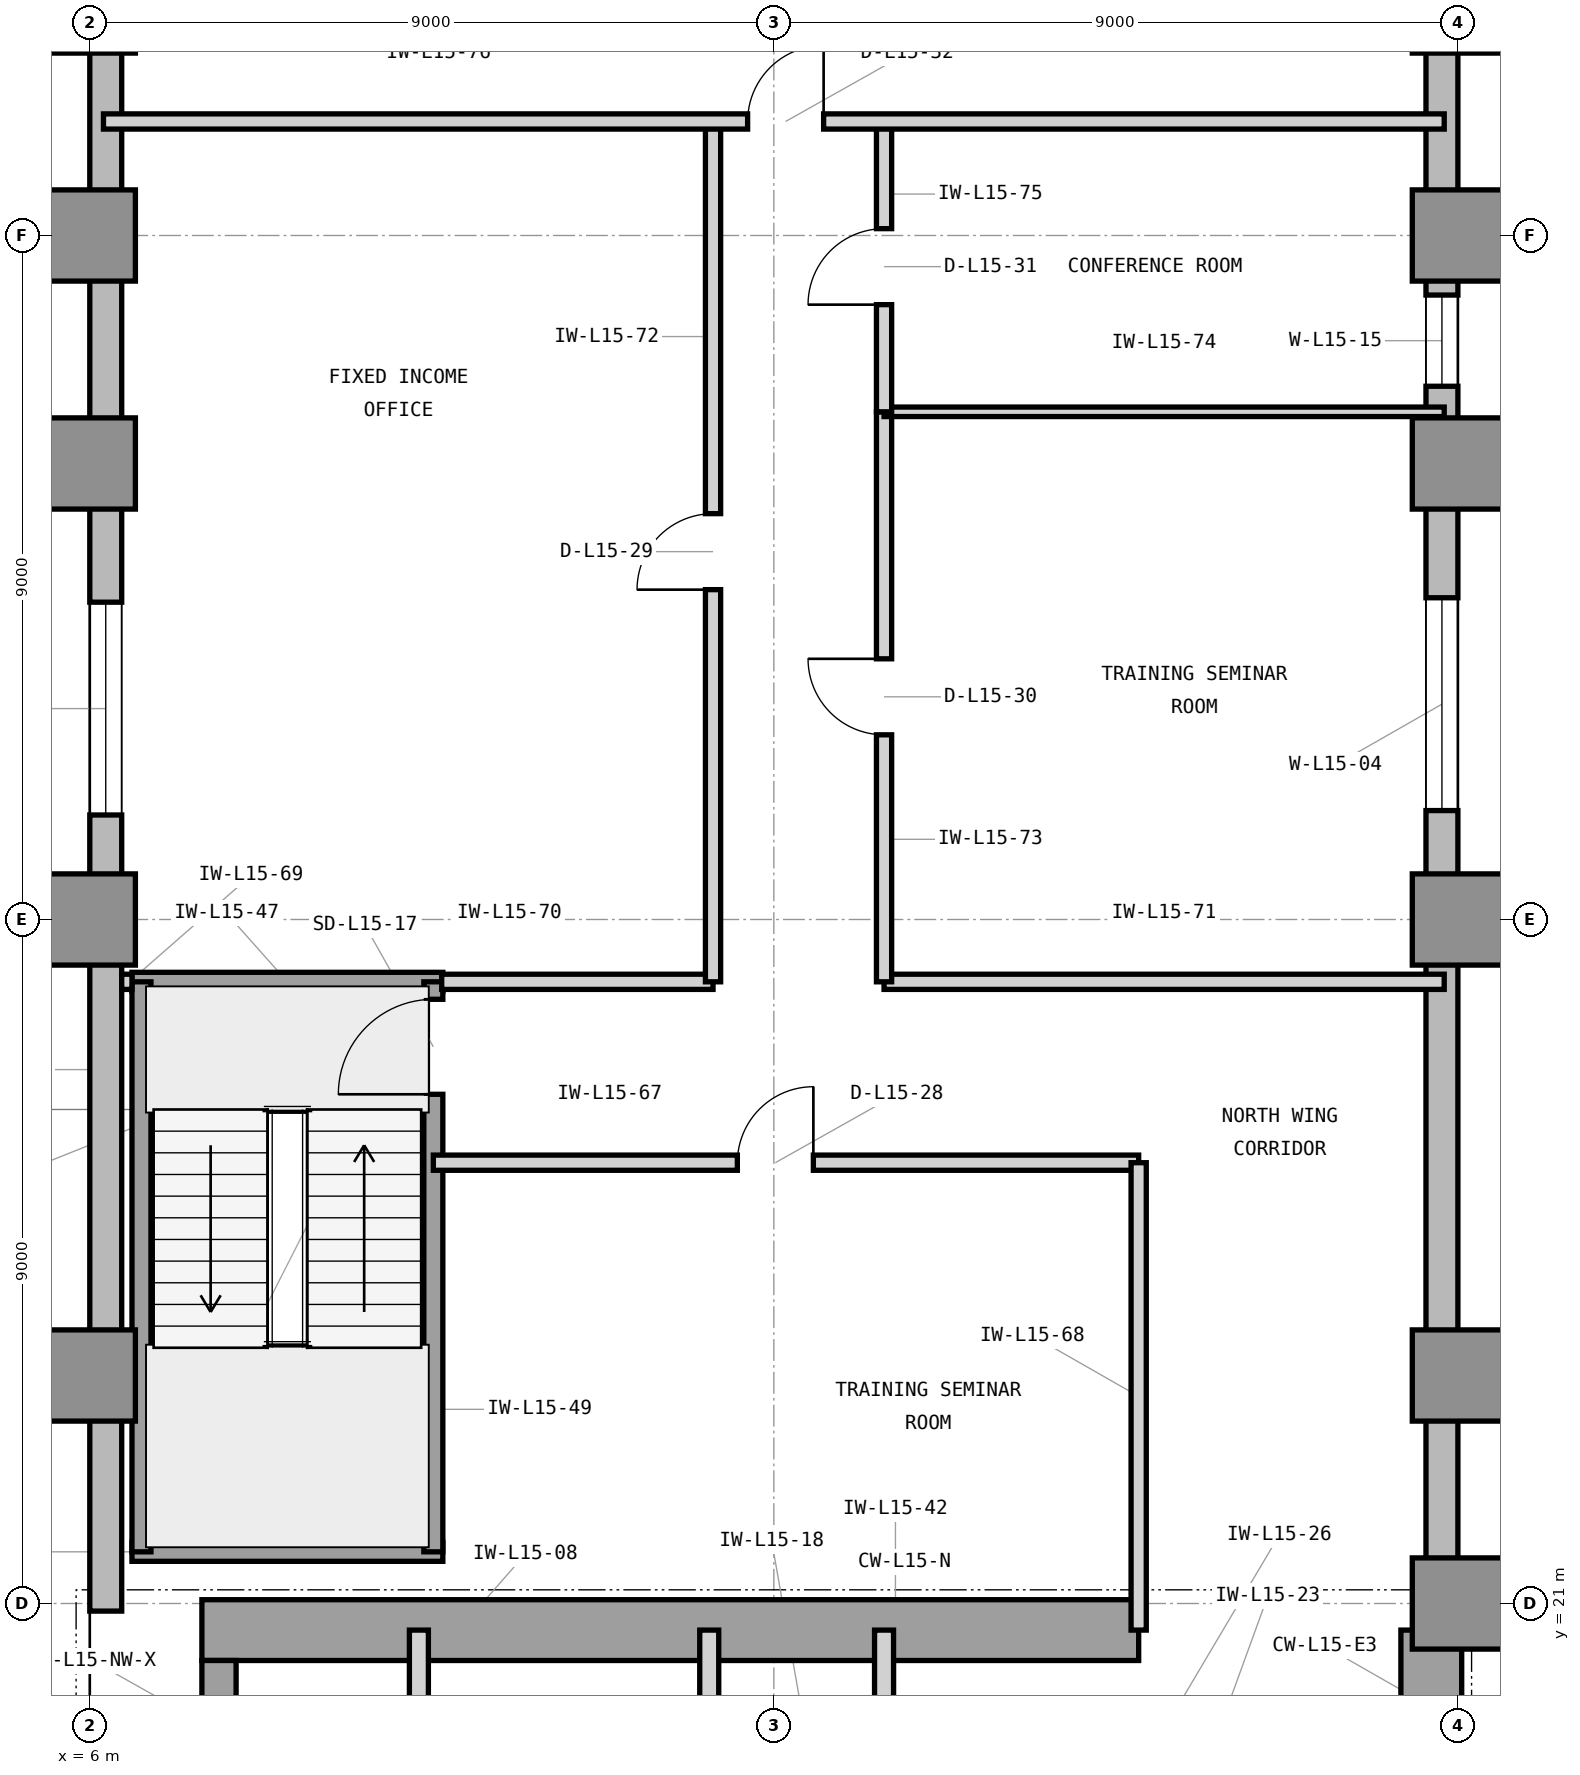
"""IFC4 building model, lengths in metres.
Left out: names, types, materials, properties, quantities, classifications, styles, units other than length and angle.
Written with IfcOpenShell. Run it as: python <this file> out.ifc"""

import sys

from ifc_helpers import new_model, si_unit, direction, frame, frame_2d, origin, origin_2d, place, context, subcontext, project, spatial, rectangle, extrude, element, fill, save


model = new_model("IFC4")
c1 = context("Model", 3, precision=1e-05, world=origin(), true_north=direction((0.0, 1.0)))
c2 = subcontext(c1, "Body", "Model", "MODEL_VIEW")
j1 = project(units=[si_unit("LENGTHUNIT", "METRE"), si_unit("PLANEANGLEUNIT", "RADIAN")], contexts=[c1])
p1 = place(None, origin())
s1 = spatial("IfcSite", under=j1, at=p1, CompositionType="ELEMENT")
p2 = place(p1, origin())
s2 = spatial("IfcBuilding", under=s1, at=p2, CompositionType="ELEMENT")
p3 = place(p2, frame((0.0, 0.0, 67.8)))
s3 = spatial("IfcBuildingStorey", under=s2, at=p3, CompositionType="ELEMENT", Elevation=67.8)
p4 = place(p3, frame((7.475, 20.65, 0.0), z_axis=(0.0, 0.0, 1.0), x_axis=(1.0, 0.0, 0.0)))
e1 = element("IfcWall", 1, at=p4, inside=s3, PredefinedType="SHEAR", context=c2, shape_type="SweptSolid", body=[
    extrude(rectangle(XDim=12.325, YDim=0.8, at=frame_2d((6.163, 0.0))), origin(), (0.0, 0.0, 1.0), 4.2),
])
p5 = place(p3, frame((23.65, 16.6, 0.0), z_axis=(0.0, 0.0, 1.0), x_axis=(0.0, 1.0, 0.0)))
e2 = element("IfcWall", 2, at=p5, inside=s3, PredefinedType="SHEAR", context=c2, shape_type="SweptSolid", body=[
    extrude(rectangle(XDim=4.05, YDim=0.8, at=frame_2d((2.025, 0.0))), origin(), (0.0, 0.0, 1.0), 4.2),
])
p6 = place(p3, frame((7.7, 19.575, 0.0), z_axis=(0.0, 0.0, 1.0), x_axis=(0.0, 1.0, 0.0)))
e3 = element("IfcWall", 3, at=p6, inside=s3, PredefinedType="SHEAR", context=c2, shape_type="SweptSolid", body=[
    extrude(rectangle(XDim=0.675, YDim=0.45, at=frame_2d((0.337, 0.0))), origin(), (0.0, 0.0, 1.0), 4.2),
])
for number, where, z_axis, x_axis in (
    (4, (24.0, 21.0, 0.0), (0.0, 0.0, 1.0), (1.0, 0.0, 0.0)),
    (5, (6.0, 24.0, 0.0), (0.0, 0.0, 1.0), (1.0, 0.0, 0.0)),
    (6, (24.0, 24.0, 0.0), (0.0, 0.0, 1.0), (1.0, 0.0, 0.0)),
    (7, (6.0, 30.0, 0.0), (0.0, 0.0, 1.0), (1.0, 0.0, 0.0)),
    (8, (24.0, 30.0, 0.0), (0.0, 0.0, 1.0), (1.0, 0.0, 0.0)),
    (9, (6.0, 36.0, 0.0), (0.0, 0.0, 1.0), (1.0, 0.0, 0.0)),
    (10, (24.0, 36.0, 0.0), (0.0, 0.0, 1.0), (1.0, 0.0, 0.0)),
    (11, (6.0, 39.0, 0.0), (0.0, 0.0, 1.0), (1.0, 0.0, 0.0)),
    (12, (24.0, 39.0, 0.0), (0.0, 0.0, 1.0), (1.0, 0.0, 0.0)),
    (13, (6.0, 42.0, 0.0), (0.0, 0.0, 1.0), (1.0, 0.0, 0.0)),
    (14, (24.0, 42.0, 0.0), (0.0, 0.0, 1.0), (1.0, 0.0, 0.0)),
):
    element("IfcColumn", number, at=place(p3, frame(where, z_axis=z_axis, x_axis=x_axis)), inside=s3, PredefinedType="COLUMN", context=c2, shape_type="SweptSolid", body=[
        extrude(rectangle(XDim=1.2, YDim=1.2, at=origin_2d()), origin(), (0.0, 0.0, 1.0), 4.2),
    ])
p7 = place(p3, frame((64.4, 20.79, 0.0), z_axis=(0.0, 0.0, 1.0), x_axis=(-1.0, 0.0, 0.0)))
e15 = element("IfcWall", 15, at=p7, inside=s3, PredefinedType="STANDARD", context=c2, shape_type="SweptSolid", body=[
    extrude(rectangle(XDim=40.4, YDim=0.42, at=frame_2d((20.2, 0.0))), origin(), (0.0, 0.0, 1.0), 3.98),
])
p8 = place(p7, frame((26.375, 0.0, 0.85)))
e16 = element("IfcOpeningElement", 16, at=p8, cuts=e15, PredefinedType="OPENING", context=c2, shape_type="SweptSolid", body=[
    extrude(rectangle(XDim=2.8, YDim=2.45, at=frame_2d((1.4, 1.225))), frame((0.0, 0.22, 0.0), z_axis=(0.0, -1.0, 0.0), x_axis=(1.0, 0.0, 0.0)), (0.0, 0.0, 1.0), 0.44),
])
p9 = place(p7, frame((38.222, 0.0, 0.85)))
e17 = element("IfcOpeningElement", 17, at=p9, cuts=e15, PredefinedType="OPENING", context=c2, shape_type="SweptSolid", body=[
    extrude(rectangle(XDim=1.2, YDim=2.45, at=frame_2d((0.6, 1.225))), frame((0.0, 0.22, 0.0), z_axis=(0.0, -1.0, 0.0), x_axis=(1.0, 0.0, 0.0)), (0.0, 0.0, 1.0), 0.44),
])
p10 = place(p7, frame((32.536, 0.0, 0.85)))
e18 = element("IfcOpeningElement", 18, at=p10, cuts=e15, PredefinedType="OPENING", context=c2, shape_type="SweptSolid", body=[
    extrude(rectangle(XDim=2.8, YDim=2.45, at=frame_2d((1.4, 1.225))), frame((0.0, 0.22, 0.0), z_axis=(0.0, -1.0, 0.0), x_axis=(1.0, 0.0, 0.0)), (0.0, 0.0, 1.0), 0.44),
])
p11 = place(p7, frame((17.386, 0.0, 0.85)))
e19 = element("IfcOpeningElement", 19, at=p11, cuts=e15, PredefinedType="OPENING", context=c2, shape_type="SweptSolid", body=[
    extrude(rectangle(XDim=2.8, YDim=2.45, at=frame_2d((1.4, 1.225))), frame((0.0, 0.22, 0.0), z_axis=(0.0, -1.0, 0.0), x_axis=(1.0, 0.0, 0.0)), (0.0, 0.0, 1.0), 0.44),
])
p12 = place(p3, frame((23.79, 21.0, 0.0), z_axis=(0.0, 0.0, 1.0), x_axis=(0.0, 1.0, 0.0)))
e20 = element("IfcWall", 20, at=p12, inside=s3, PredefinedType="STANDARD", context=c2, shape_type="SweptSolid", body=[
    extrude(rectangle(XDim=28.4, YDim=0.42, at=frame_2d((14.2, 0.0))), origin(), (0.0, 0.0, 1.0), 3.98),
])
p13 = place(p12, frame((10.433, 0.0, 0.85)))
e21 = element("IfcOpeningElement", 21, at=p13, cuts=e20, PredefinedType="OPENING", context=c2, shape_type="SweptSolid", body=[
    extrude(rectangle(XDim=2.8, YDim=2.45, at=frame_2d((1.4, 1.225))), frame((0.0, 0.22, 0.0), z_axis=(0.0, -1.0, 0.0), x_axis=(1.0, 0.0, 0.0)), (0.0, 0.0, 1.0), 0.44),
])
p14 = place(p12, frame((16.016, 0.0, 0.85)))
e22 = element("IfcOpeningElement", 22, at=p14, cuts=e20, PredefinedType="OPENING", context=c2, shape_type="SweptSolid", body=[
    extrude(rectangle(XDim=1.2, YDim=2.45, at=frame_2d((0.6, 1.225))), frame((0.0, 0.22, 0.0), z_axis=(0.0, -1.0, 0.0), x_axis=(1.0, 0.0, 0.0)), (0.0, 0.0, 1.0), 0.44),
])
p15 = place(p3, frame((6.21, 49.4, 0.0), z_axis=(0.0, 0.0, 1.0), x_axis=(0.0, -1.0, 0.0)))
e23 = element("IfcWall", 23, at=p15, inside=s3, PredefinedType="STANDARD", context=c2, shape_type="SweptSolid", body=[
    extrude(rectangle(XDim=28.5, YDim=0.42, at=frame_2d((14.25, 0.0))), origin(), (0.0, 0.0, 1.0), 3.98),
])
p16 = place(p15, frame((15.225, 0.0, 0.85)))
e24 = element("IfcOpeningElement", 24, at=p16, cuts=e23, PredefinedType="OPENING", context=c2, shape_type="SweptSolid", body=[
    extrude(rectangle(XDim=2.8, YDim=2.45, at=frame_2d((1.4, 1.225))), frame((0.0, 0.22, 0.0), z_axis=(0.0, -1.0, 0.0), x_axis=(1.0, 0.0, 0.0)), (0.0, 0.0, 1.0), 0.44),
])
p17 = place(p3, frame((10.33, 19.45, 0.0), z_axis=(0.0, 0.0, 1.0), x_axis=(0.0, 1.0, 0.0)))
e25 = element("IfcWall", 25, at=p17, inside=s3, PredefinedType="PARTITIONING", context=c2, shape_type="SweptSolid", body=[
    extrude(rectangle(XDim=1.2, YDim=0.25, at=frame_2d((0.6, 0.0))), origin(), (0.0, 0.0, 1.0), 3.114),
])
for number, where, z_axis, x_axis in (
    (26, (14.15, 16.7, 0.0), (0.0, 0.0, 1.0), (0.0, 1.0, 0.0)),
    (27, (16.45, 16.7, 0.0), (0.0, 0.0, 1.0), (0.0, 1.0, 0.0)),
):
    element("IfcWall", number, at=place(p3, frame(where, z_axis=z_axis, x_axis=x_axis)), inside=s3, PredefinedType="PARTITIONING", context=c2, shape_type="SweptSolid", body=[
        extrude(rectangle(XDim=3.95, YDim=0.25, at=frame_2d((1.975, 0.0))), origin(), (0.0, 0.0, 1.0), 3.97),
    ])
for number, where, z_axis, x_axis in (
    (28, (6.555, 21.68, 0.0), (0.0, 0.0, 1.0), (1.0, 0.0, 0.0)),
    (29, (6.555, 29.18, 0.0), (0.0, 0.0, 1.0), (1.0, 0.0, 0.0)),
):
    element("IfcWall", number, at=place(p3, frame(where, z_axis=z_axis, x_axis=x_axis)), inside=s3, PredefinedType="SHEAR", context=c2, shape_type="SweptSolid", body=[
        extrude(rectangle(XDim=4.09, YDim=0.25, at=frame_2d((2.045, 0.0))), origin(), (0.0, 0.0, 1.0), 4.2),
    ])
p18 = place(p3, frame((6.68, 21.68, 0.0), z_axis=(0.0, 0.0, 1.0), x_axis=(0.0, 1.0, 0.0)))
e30 = element("IfcWall", 30, at=p18, inside=s3, PredefinedType="SHEAR", context=c2, shape_type="SweptSolid", body=[
    extrude(rectangle(XDim=7.5, YDim=0.25, at=frame_2d((3.75, 0.0))), origin(), (0.0, 0.0, 1.0), 4.2),
])
p19 = place(p3, frame((10.52, 21.68, 0.0), z_axis=(0.0, 0.0, 1.0), x_axis=(0.0, 1.0, 0.0)))
e31 = element("IfcWall", 31, at=p19, inside=s3, PredefinedType="SHEAR", context=c2, shape_type="SweptSolid", body=[
    extrude(rectangle(XDim=7.5, YDim=0.25, at=frame_2d((3.75, 0.0))), origin(), (0.0, 0.0, 1.0), 4.2),
])
p20 = place(p19, frame((6.02, 0.0, 0.0)))
e32 = element("IfcOpeningElement", 32, at=p20, cuts=e31, PredefinedType="OPENING", context=c2, shape_type="SweptSolid", body=[
    extrude(rectangle(XDim=1.25, YDim=2.2, at=frame_2d((0.625, 1.1))), frame((0.0, 0.135, 0.0), z_axis=(0.0, -1.0, 0.0), x_axis=(1.0, 0.0, 0.0)), (0.0, 0.0, 1.0), 0.27),
])
p21 = place(p3, frame((10.52, 26.8, 0.0), z_axis=(0.0, 0.0, 1.0), x_axis=(1.0, 0.0, 0.0)))
e33 = element("IfcWall", 33, at=p21, inside=s3, PredefinedType="PARTITIONING", context=c2, shape_type="SweptSolid", body=[
    extrude(rectangle(XDim=9.28, YDim=0.2, at=frame_2d((4.64, 0.0))), origin(), (0.0, 0.0, 1.0), 3.97),
])
p22 = place(p21, frame((4.0, 0.0, 0.0)))
e34 = element("IfcOpeningElement", 34, at=p22, cuts=e33, PredefinedType="OPENING", context=c2, shape_type="SweptSolid", body=[
    extrude(rectangle(XDim=1.0, YDim=2.15, at=frame_2d((0.5, 1.075))), frame((0.0, 0.11, 0.0), z_axis=(0.0, -1.0, 0.0), x_axis=(1.0, 0.0, 0.0)), (0.0, 0.0, 1.0), 0.22),
])
p23 = place(p3, frame((19.8, 20.65, 0.0), z_axis=(0.0, 0.0, 1.0), x_axis=(0.0, 1.0, 0.0)))
e35 = element("IfcWall", 35, at=p23, inside=s3, PredefinedType="PARTITIONING", context=c2, shape_type="SweptSolid", body=[
    extrude(rectangle(XDim=6.15, YDim=0.2, at=frame_2d((3.075, 0.0))), origin(), (0.0, 0.0, 1.0), 3.97),
])
p24 = place(p3, frame((6.42, 29.18, 0.0), z_axis=(0.0, 0.0, 1.0), x_axis=(1.0, 0.0, 0.0)))
e36 = element("IfcWall", 36, at=p24, inside=s3, PredefinedType="PARTITIONING", context=c2, shape_type="SweptSolid", body=[
    extrude(rectangle(XDim=0.135, YDim=0.2, at=frame_2d((0.067, 0.0))), origin(), (0.0, 0.0, 1.0), 3.97),
])
p25 = place(p3, frame((10.63, 29.18, 0.0), z_axis=(0.0, 0.0, 1.0), x_axis=(1.0, 0.0, 0.0)))
e37 = element("IfcWall", 37, at=p25, inside=s3, PredefinedType="PARTITIONING", context=c2, shape_type="SweptSolid", body=[
    extrude(rectangle(XDim=3.57, YDim=0.2, at=frame_2d((1.785, 0.0))), origin(), (0.0, 0.0, 1.0), 3.97),
])
p26 = place(p3, frame((16.45, 29.18, 0.0), z_axis=(0.0, 0.0, 1.0), x_axis=(1.0, 0.0, 0.0)))
e38 = element("IfcWall", 38, at=p26, inside=s3, PredefinedType="PARTITIONING", context=c2, shape_type="SweptSolid", body=[
    extrude(rectangle(XDim=7.37, YDim=0.2, at=frame_2d((3.685, 0.0))), origin(), (0.0, 0.0, 1.0), 3.97),
])
p27 = place(p3, frame((14.2, 29.18, 0.0), z_axis=(0.0, 0.0, 1.0), x_axis=(0.0, 1.0, 0.0)))
e39 = element("IfcWall", 39, at=p27, inside=s3, PredefinedType="PARTITIONING", context=c2, shape_type="SweptSolid", body=[
    extrude(rectangle(XDim=11.32, YDim=0.2, at=frame_2d((5.66, 0.0))), origin(), (0.0, 0.0, 1.0), 3.97),
])
p28 = place(p27, frame((5.16, 0.0, 0.0)))
e40 = element("IfcOpeningElement", 40, at=p28, cuts=e39, PredefinedType="OPENING", context=c2, shape_type="SweptSolid", body=[
    extrude(rectangle(XDim=1.0, YDim=2.15, at=frame_2d((0.5, 1.075))), frame((0.0, 0.11, 0.0), z_axis=(0.0, -1.0, 0.0), x_axis=(1.0, 0.0, 0.0)), (0.0, 0.0, 1.0), 0.22),
])
p29 = place(p3, frame((16.45, 29.18, 0.0), z_axis=(0.0, 0.0, 1.0), x_axis=(0.0, 1.0, 0.0)))
e41 = element("IfcWall", 41, at=p29, inside=s3, PredefinedType="PARTITIONING", context=c2, shape_type="SweptSolid", body=[
    extrude(rectangle(XDim=7.5, YDim=0.2, at=frame_2d((3.75, 0.0))), origin(), (0.0, 0.0, 1.0), 3.97),
])
p30 = place(p29, frame((3.25, 0.0, 0.0)))
e42 = element("IfcOpeningElement", 42, at=p30, cuts=e41, PredefinedType="OPENING", context=c2, shape_type="SweptSolid", body=[
    extrude(rectangle(XDim=1.0, YDim=2.15, at=frame_2d((0.5, 1.075))), frame((0.0, 0.11, 0.0), z_axis=(0.0, -1.0, 0.0), x_axis=(1.0, 0.0, 0.0)), (0.0, 0.0, 1.0), 0.22),
])
p31 = place(p3, frame((16.45, 36.68, 0.0), z_axis=(0.0, 0.0, 1.0), x_axis=(1.0, 0.0, 0.0)))
e43 = element("IfcWall", 43, at=p31, inside=s3, PredefinedType="PARTITIONING", context=c2, shape_type="SweptSolid", body=[
    extrude(rectangle(XDim=7.37, YDim=0.125, at=frame_2d((3.685, 0.0))), origin(), (0.0, 0.0, 1.0), 3.97),
])
p32 = place(p3, frame((16.45, 36.68, 0.0), z_axis=(0.0, 0.0, 1.0), x_axis=(0.0, 1.0, 0.0)))
e44 = element("IfcWall", 44, at=p32, inside=s3, PredefinedType="PARTITIONING", context=c2, shape_type="SweptSolid", body=[
    extrude(rectangle(XDim=3.82, YDim=0.2, at=frame_2d((1.91, 0.0))), origin(), (0.0, 0.0, 1.0), 3.97),
])
p33 = place(p32, frame((1.41, 0.0, 0.0)))
e45 = element("IfcOpeningElement", 45, at=p33, cuts=e44, PredefinedType="OPENING", context=c2, shape_type="SweptSolid", body=[
    extrude(rectangle(XDim=1.0, YDim=2.15, at=frame_2d((0.5, 1.075))), frame((0.0, 0.11, 0.0), z_axis=(0.0, -1.0, 0.0), x_axis=(1.0, 0.0, 0.0)), (0.0, 0.0, 1.0), 0.22),
])
p34 = place(p3, frame((6.18, 40.5, 0.0), z_axis=(0.0, 0.0, 1.0), x_axis=(1.0, 0.0, 0.0)))
e46 = element("IfcWall", 46, at=p34, inside=s3, PredefinedType="PARTITIONING", context=c2, shape_type="SweptSolid", body=[
    extrude(rectangle(XDim=17.64, YDim=0.2, at=frame_2d((8.82, 0.0))), origin(), (0.0, 0.0, 1.0), 3.97),
])
p35 = place(p34, frame((8.475, 0.0, 0.0)))
e47 = element("IfcOpeningElement", 47, at=p35, cuts=e46, PredefinedType="OPENING", context=c2, shape_type="SweptSolid", body=[
    extrude(rectangle(XDim=1.0, YDim=2.15, at=frame_2d((0.5, 1.075))), frame((0.0, 0.11, 0.0), z_axis=(0.0, -1.0, 0.0), x_axis=(1.0, 0.0, 0.0)), (0.0, 0.0, 1.0), 0.22),
])
p36 = place(p13, origin())
e48 = element("IfcWindow", 48, at=p36, inside=s3, PartitioningType="SINGLE_PANEL", PredefinedType="WINDOW", context=c2, shape_type="SweptSolid", body=[
    extrude(rectangle(XDim=2.8, YDim=2.45, at=frame_2d((1.4, 1.225))), frame((0.0, 0.11, 0.0), z_axis=(0.0, -1.0, 0.0), x_axis=(1.0, 0.0, 0.0)), (0.0, 0.0, 1.0), 0.06),
])
fill(e21, e48)
p37 = place(p16, origin())
e49 = element("IfcWindow", 49, at=p37, inside=s3, PartitioningType="SINGLE_PANEL", PredefinedType="WINDOW", context=c2, shape_type="SweptSolid", body=[
    extrude(rectangle(XDim=2.8, YDim=2.45, at=frame_2d((1.4, 1.225))), frame((0.0, 0.11, 0.0), z_axis=(0.0, -1.0, 0.0), x_axis=(1.0, 0.0, 0.0)), (0.0, 0.0, 1.0), 0.06),
])
fill(e24, e49)
p38 = place(p20, origin())
e50 = element("IfcDoor", 50, at=p38, inside=s3, OperationType="SINGLE_SWING_LEFT", PredefinedType="DOOR", context=c2, shape_type="SweptSolid", body=[
    extrude(rectangle(XDim=1.25, YDim=2.2, at=frame_2d((0.625, 1.1))), frame((0.0, 0.025, 0.0), z_axis=(0.0, -1.0, 0.0), x_axis=(1.0, 0.0, 0.0)), (0.0, 0.0, 1.0), 0.05),
])
fill(e32, e50)
p39 = place(p22, origin())
e51 = element("IfcDoor", 51, at=p39, inside=s3, OperationType="SINGLE_SWING_RIGHT", PredefinedType="DOOR", context=c2, shape_type="SweptSolid", body=[
    extrude(rectangle(XDim=1.0, YDim=2.15, at=frame_2d((0.5, 1.075))), frame((0.0, 0.025, 0.0), z_axis=(0.0, -1.0, 0.0), x_axis=(1.0, 0.0, 0.0)), (0.0, 0.0, 1.0), 0.05),
])
fill(e34, e51)
p40 = place(p28, origin())
e52 = element("IfcDoor", 52, at=p40, inside=s3, OperationType="SINGLE_SWING_LEFT", PredefinedType="DOOR", context=c2, shape_type="SweptSolid", body=[
    extrude(rectangle(XDim=1.0, YDim=2.15, at=frame_2d((0.5, 1.075))), frame((0.0, 0.025, 0.0), z_axis=(0.0, -1.0, 0.0), x_axis=(1.0, 0.0, 0.0)), (0.0, 0.0, 1.0), 0.05),
])
fill(e40, e52)
p41 = place(p30, origin())
e53 = element("IfcDoor", 53, at=p41, inside=s3, OperationType="SINGLE_SWING_RIGHT", PredefinedType="DOOR", context=c2, shape_type="SweptSolid", body=[
    extrude(rectangle(XDim=1.0, YDim=2.15, at=frame_2d((0.5, 1.075))), frame((0.0, 0.025, 0.0), z_axis=(0.0, -1.0, 0.0), x_axis=(1.0, 0.0, 0.0)), (0.0, 0.0, 1.0), 0.05),
])
fill(e42, e53)
p42 = place(p33, origin())
e54 = element("IfcDoor", 54, at=p42, inside=s3, OperationType="SINGLE_SWING_LEFT", PredefinedType="DOOR", context=c2, shape_type="SweptSolid", body=[
    extrude(rectangle(XDim=1.0, YDim=2.15, at=frame_2d((0.5, 1.075))), frame((0.0, 0.025, 0.0), z_axis=(0.0, -1.0, 0.0), x_axis=(1.0, 0.0, 0.0)), (0.0, 0.0, 1.0), 0.05),
])
fill(e45, e54)
p43 = place(p35, origin())
e55 = element("IfcDoor", 55, at=p43, inside=s3, OperationType="SINGLE_SWING_RIGHT", PredefinedType="DOOR", context=c2, shape_type="SweptSolid", body=[
    extrude(rectangle(XDim=1.0, YDim=2.15, at=frame_2d((0.5, 1.075))), frame((0.0, 0.025, 0.0), z_axis=(0.0, -1.0, 0.0), x_axis=(1.0, 0.0, 0.0)), (0.0, 0.0, 1.0), 0.05),
])
fill(e47, e55)
p44 = place(p14, origin())
e56 = element("IfcWindow", 56, at=p44, inside=s3, PartitioningType="SINGLE_PANEL", PredefinedType="WINDOW", context=c2, shape_type="SweptSolid", body=[
    extrude(rectangle(XDim=1.2, YDim=2.45, at=frame_2d((0.6, 1.225))), frame((0.0, 0.11, 0.0), z_axis=(0.0, -1.0, 0.0), x_axis=(1.0, 0.0, 0.0)), (0.0, 0.0, 1.0), 0.06),
])
fill(e22, e56)
save(model, sys.argv[1])
